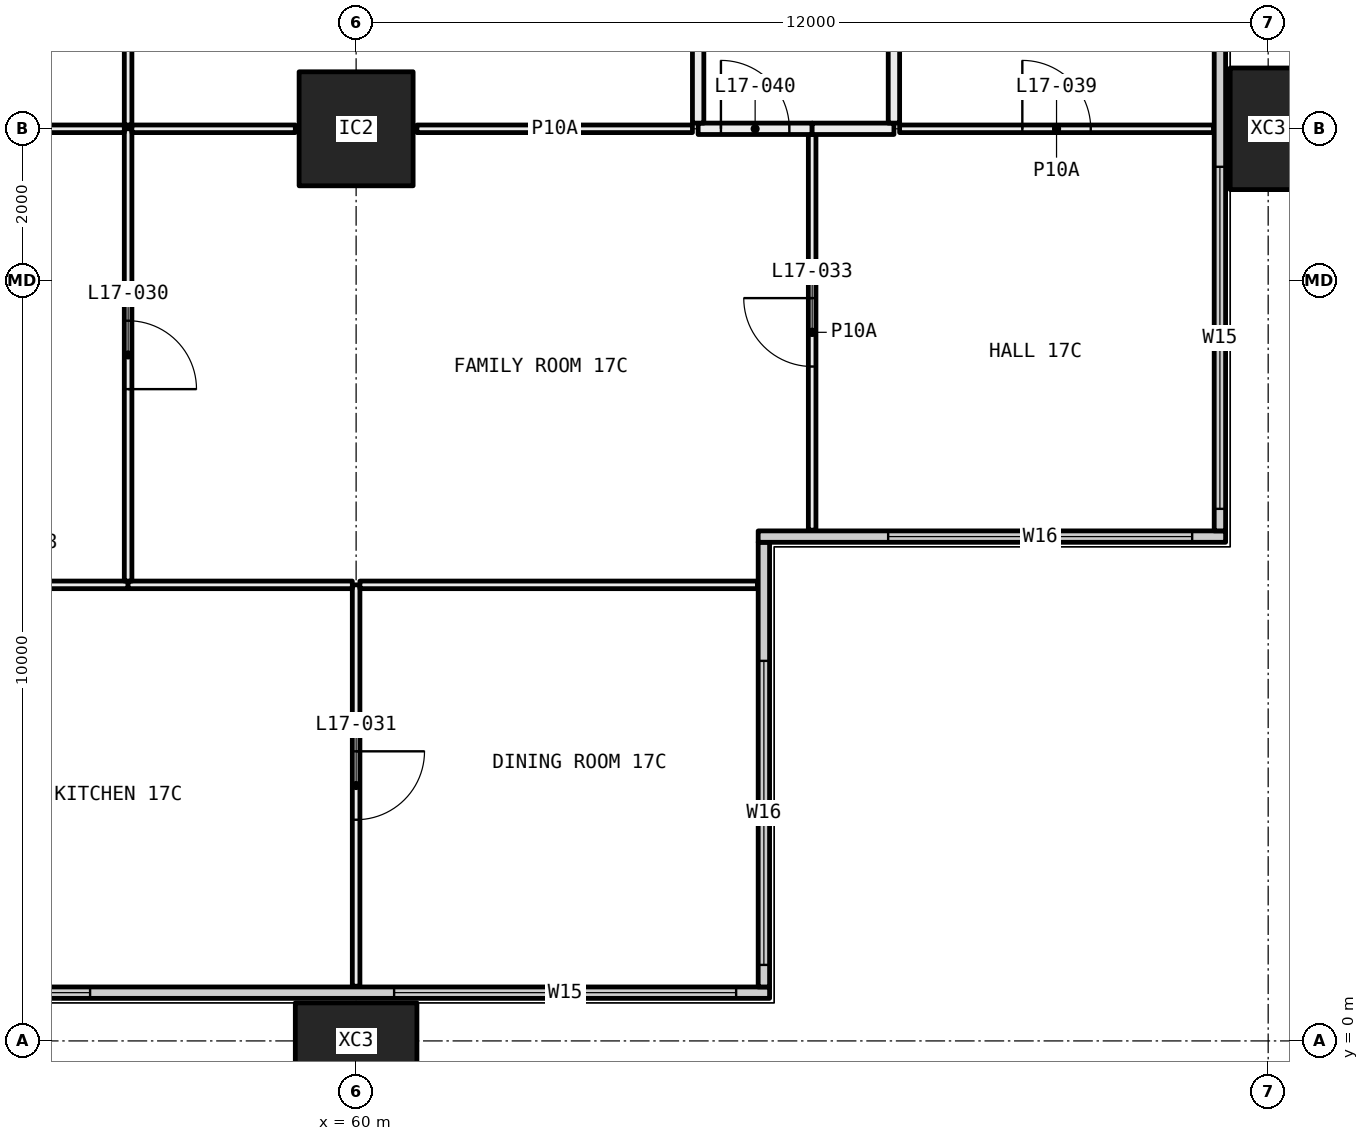
"""IFC4 building model, lengths in metres.
Left out: names, types, materials, properties, quantities, classifications, styles, units other than length and angle.
Written with IfcOpenShell. Run it as: python <this file> out.ifc"""

import sys

from ifc_helpers import new_model, si_unit, direction, frame, frame_2d, origin, origin_2d, place, context, subcontext, project, spatial, rectangle, hollow_rectangle, extrude, element, fill, save


model = new_model("IFC4")
c1 = context("Model", 3, precision=1e-05, world=origin(), true_north=direction((0.0, 1.0)))
c2 = subcontext(c1, "Body", "Model", "MODEL_VIEW")
j1 = project(units=[si_unit("LENGTHUNIT", "METRE"), si_unit("PLANEANGLEUNIT", "RADIAN")], contexts=[c1])
p1 = place(None, origin())
s1 = spatial("IfcSite", under=j1, at=p1, CompositionType="ELEMENT")
p2 = place(p1, origin())
s2 = spatial("IfcBuilding", under=s1, at=p2, CompositionType="ELEMENT")
p3 = place(p2, frame((0.0, 0.0, 71.4)))
s3 = spatial("IfcBuildingStorey", under=s2, at=p3, CompositionType="ELEMENT", Elevation=71.4)
p4 = place(p3, frame((60.0, 0.0, -0.4), z_axis=(0.0, 0.0, 1.0), x_axis=(1.0, 0.0, 0.0)))
e1 = element("IfcColumn", 1, at=p4, inside=s3, PredefinedType="COLUMN", context=c2, shape_type="SweptSolid", body=[
    extrude(hollow_rectangle(XDim=1.6, YDim=1.0, WallThickness=0.065, at=origin_2d()), origin(), (0.0, 0.0, 1.0), 3.45),
])
p5 = place(p3, frame((60.0, 12.0, 0.0), z_axis=(0.0, 0.0, 1.0), x_axis=(1.0, 0.0, 0.0)))
e2 = element("IfcColumn", 2, at=p5, inside=s3, PredefinedType="COLUMN", context=c2, shape_type="SweptSolid", body=[
    extrude(hollow_rectangle(XDim=1.5, YDim=1.5, WallThickness=0.065, at=origin_2d()), origin(), (0.0, 0.0, 1.0), 3.05),
])
p6 = place(p3, frame((72.0, 12.0, -0.4), z_axis=(0.0, 0.0, 1.0), x_axis=(0.0, 1.0, 0.0)))
e3 = element("IfcColumn", 3, at=p6, inside=s3, PredefinedType="COLUMN", context=c2, shape_type="SweptSolid", body=[
    extrude(hollow_rectangle(XDim=1.6, YDim=1.0, WallThickness=0.065, at=origin_2d()), origin(), (0.0, 0.0, 1.0), 3.45),
])
p7 = place(p3, frame((6.56, 0.635, 0.0), z_axis=(0.0, 0.0, 1.0), x_axis=(1.0, 0.0, 0.0)))
e4 = element("IfcWall", 4, at=p7, inside=s3, PredefinedType="ELEMENTEDWALL", context=c2, shape_type="SweptSolid", body=[
    extrude(rectangle(XDim=58.88, YDim=0.15, at=frame_2d((29.44, 0.0))), origin(), (0.0, 0.0, 1.0), 3.05),
])
p8 = place(p7, frame((0.44, 0.0, 0.45)))
e5 = element("IfcOpeningElement", 5, at=p8, cuts=e4, PredefinedType="OPENING", context=c2, shape_type="SweptSolid", body=[
    extrude(rectangle(XDim=4.5, YDim=2.55, at=frame_2d((2.25, 1.275))), frame((0.0, 0.085, 0.0), z_axis=(0.0, -1.0, 0.0), x_axis=(1.0, 0.0, 0.0)), (0.0, 0.0, 1.0), 0.17),
])
p9 = place(p7, frame((7.94, 0.0, 0.45)))
e6 = element("IfcOpeningElement", 6, at=p9, cuts=e4, PredefinedType="OPENING", context=c2, shape_type="SweptSolid", body=[
    extrude(rectangle(XDim=3.0, YDim=2.55, at=frame_2d((1.5, 1.275))), frame((0.0, 0.085, 0.0), z_axis=(0.0, -1.0, 0.0), x_axis=(1.0, 0.0, 0.0)), (0.0, 0.0, 1.0), 0.17),
])
p10 = place(p7, frame((11.94, 0.0, 0.45)))
e7 = element("IfcOpeningElement", 7, at=p10, cuts=e4, PredefinedType="OPENING", context=c2, shape_type="SweptSolid", body=[
    extrude(rectangle(XDim=3.0, YDim=2.55, at=frame_2d((1.5, 1.275))), frame((0.0, 0.085, 0.0), z_axis=(0.0, -1.0, 0.0), x_axis=(1.0, 0.0, 0.0)), (0.0, 0.0, 1.0), 0.17),
])
p11 = place(p7, frame((19.94, 0.0, 0.45)))
e8 = element("IfcOpeningElement", 8, at=p11, cuts=e4, PredefinedType="OPENING", context=c2, shape_type="SweptSolid", body=[
    extrude(rectangle(XDim=3.0, YDim=2.55, at=frame_2d((1.5, 1.275))), frame((0.0, 0.085, 0.0), z_axis=(0.0, -1.0, 0.0), x_axis=(1.0, 0.0, 0.0)), (0.0, 0.0, 1.0), 0.17),
])
p12 = place(p7, frame((23.94, 0.0, 0.45)))
e9 = element("IfcOpeningElement", 9, at=p12, cuts=e4, PredefinedType="OPENING", context=c2, shape_type="SweptSolid", body=[
    extrude(rectangle(XDim=2.0, YDim=2.55, at=frame_2d((1.0, 1.275))), frame((0.0, 0.085, 0.0), z_axis=(0.0, -1.0, 0.0), x_axis=(1.0, 0.0, 0.0)), (0.0, 0.0, 1.0), 0.17),
])
p13 = place(p7, frame((31.94, 0.0, 0.45)))
e10 = element("IfcOpeningElement", 10, at=p13, cuts=e4, PredefinedType="OPENING", context=c2, shape_type="SweptSolid", body=[
    extrude(rectangle(XDim=3.0, YDim=2.55, at=frame_2d((1.5, 1.275))), frame((0.0, 0.085, 0.0), z_axis=(0.0, -1.0, 0.0), x_axis=(1.0, 0.0, 0.0)), (0.0, 0.0, 1.0), 0.17),
])
p14 = place(p7, frame((35.94, 0.0, 0.45)))
e11 = element("IfcOpeningElement", 11, at=p14, cuts=e4, PredefinedType="OPENING", context=c2, shape_type="SweptSolid", body=[
    extrude(rectangle(XDim=3.0, YDim=2.55, at=frame_2d((1.5, 1.275))), frame((0.0, 0.085, 0.0), z_axis=(0.0, -1.0, 0.0), x_axis=(1.0, 0.0, 0.0)), (0.0, 0.0, 1.0), 0.17),
])
p15 = place(p7, frame((43.94, 0.0, 0.45)))
e12 = element("IfcOpeningElement", 12, at=p15, cuts=e4, PredefinedType="OPENING", context=c2, shape_type="SweptSolid", body=[
    extrude(rectangle(XDim=3.0, YDim=2.55, at=frame_2d((1.5, 1.275))), frame((0.0, 0.085, 0.0), z_axis=(0.0, -1.0, 0.0), x_axis=(1.0, 0.0, 0.0)), (0.0, 0.0, 1.0), 0.17),
])
p16 = place(p7, frame((47.94, 0.0, 0.45)))
e13 = element("IfcOpeningElement", 13, at=p16, cuts=e4, PredefinedType="OPENING", context=c2, shape_type="SweptSolid", body=[
    extrude(rectangle(XDim=2.0, YDim=2.55, at=frame_2d((1.0, 1.275))), frame((0.0, 0.085, 0.0), z_axis=(0.0, -1.0, 0.0), x_axis=(1.0, 0.0, 0.0)), (0.0, 0.0, 1.0), 0.17),
])
p17 = place(p7, frame((53.94, 0.0, 0.45)))
e14 = element("IfcOpeningElement", 14, at=p17, cuts=e4, PredefinedType="OPENING", context=c2, shape_type="SweptSolid", body=[
    extrude(rectangle(XDim=4.5, YDim=2.55, at=frame_2d((2.25, 1.275))), frame((0.0, 0.085, 0.0), z_axis=(0.0, -1.0, 0.0), x_axis=(1.0, 0.0, 0.0)), (0.0, 0.0, 1.0), 0.17),
])
p18 = place(p3, frame((65.365, 0.71, 0.0), z_axis=(0.0, 0.0, 1.0), x_axis=(0.0, 1.0, 0.0)))
e15 = element("IfcWall", 15, at=p18, inside=s3, PredefinedType="ELEMENTEDWALL", context=c2, shape_type="SweptSolid", body=[
    extrude(rectangle(XDim=5.85, YDim=0.15, at=frame_2d((2.925, 0.0))), origin(), (0.0, 0.0, 1.0), 3.05),
])
p19 = place(p18, frame((0.29, 0.0, 0.45)))
e16 = element("IfcOpeningElement", 16, at=p19, cuts=e15, PredefinedType="OPENING", context=c2, shape_type="SweptSolid", body=[
    extrude(rectangle(XDim=4.0, YDim=2.55, at=frame_2d((2.0, 1.275))), frame((0.0, 0.085, 0.0), z_axis=(0.0, -1.0, 0.0), x_axis=(1.0, 0.0, 0.0)), (0.0, 0.0, 1.0), 0.17),
])
p20 = place(p3, frame((65.29, 6.635, 0.0), z_axis=(0.0, 0.0, 1.0), x_axis=(1.0, 0.0, 0.0)))
e17 = element("IfcWall", 17, at=p20, inside=s3, PredefinedType="ELEMENTEDWALL", context=c2, shape_type="SweptSolid", body=[
    extrude(rectangle(XDim=6.15, YDim=0.15, at=frame_2d((3.075, 0.0))), origin(), (0.0, 0.0, 1.0), 3.05),
])
p21 = place(p20, frame((1.71, 0.0, 0.45)))
e18 = element("IfcOpeningElement", 18, at=p21, cuts=e17, PredefinedType="OPENING", context=c2, shape_type="SweptSolid", body=[
    extrude(rectangle(XDim=4.0, YDim=2.55, at=frame_2d((2.0, 1.275))), frame((0.0, 0.085, 0.0), z_axis=(0.0, -1.0, 0.0), x_axis=(1.0, 0.0, 0.0)), (0.0, 0.0, 1.0), 0.17),
])
p22 = place(p3, frame((71.365, 6.71, 0.0), z_axis=(0.0, 0.0, 1.0), x_axis=(0.0, 1.0, 0.0)))
e19 = element("IfcWall", 19, at=p22, inside=s3, PredefinedType="ELEMENTEDWALL", context=c2, shape_type="SweptSolid", body=[
    extrude(rectangle(XDim=34.58, YDim=0.15, at=frame_2d((17.29, 0.0))), origin(), (0.0, 0.0, 1.0), 3.05),
])
p23 = place(p22, frame((0.29, 0.0, 0.45)))
e20 = element("IfcOpeningElement", 20, at=p23, cuts=e19, PredefinedType="OPENING", context=c2, shape_type="SweptSolid", body=[
    extrude(rectangle(XDim=4.5, YDim=2.55, at=frame_2d((2.25, 1.275))), frame((0.0, 0.085, 0.0), z_axis=(0.0, -1.0, 0.0), x_axis=(1.0, 0.0, 0.0)), (0.0, 0.0, 1.0), 0.17),
])
p24 = place(p22, frame((7.79, 0.0, 0.45)))
e21 = element("IfcOpeningElement", 21, at=p24, cuts=e19, PredefinedType="OPENING", context=c2, shape_type="SweptSolid", body=[
    extrude(rectangle(XDim=3.0, YDim=2.55, at=frame_2d((1.5, 1.275))), frame((0.0, 0.085, 0.0), z_axis=(0.0, -1.0, 0.0), x_axis=(1.0, 0.0, 0.0)), (0.0, 0.0, 1.0), 0.17),
])
p25 = place(p22, frame((11.79, 0.0, 0.45)))
e22 = element("IfcOpeningElement", 22, at=p25, cuts=e19, PredefinedType="OPENING", context=c2, shape_type="SweptSolid", body=[
    extrude(rectangle(XDim=3.0, YDim=2.55, at=frame_2d((1.5, 1.275))), frame((0.0, 0.085, 0.0), z_axis=(0.0, -1.0, 0.0), x_axis=(1.0, 0.0, 0.0)), (0.0, 0.0, 1.0), 0.17),
])
p26 = place(p22, frame((19.79, 0.0, 0.45)))
e23 = element("IfcOpeningElement", 23, at=p26, cuts=e19, PredefinedType="OPENING", context=c2, shape_type="SweptSolid", body=[
    extrude(rectangle(XDim=3.0, YDim=2.55, at=frame_2d((1.5, 1.275))), frame((0.0, 0.085, 0.0), z_axis=(0.0, -1.0, 0.0), x_axis=(1.0, 0.0, 0.0)), (0.0, 0.0, 1.0), 0.17),
])
p27 = place(p22, frame((23.79, 0.0, 0.45)))
e24 = element("IfcOpeningElement", 24, at=p27, cuts=e19, PredefinedType="OPENING", context=c2, shape_type="SweptSolid", body=[
    extrude(rectangle(XDim=2.0, YDim=2.55, at=frame_2d((1.0, 1.275))), frame((0.0, 0.085, 0.0), z_axis=(0.0, -1.0, 0.0), x_axis=(1.0, 0.0, 0.0)), (0.0, 0.0, 1.0), 0.17),
])
p28 = place(p22, frame((29.79, 0.0, 0.45)))
e25 = element("IfcOpeningElement", 25, at=p28, cuts=e19, PredefinedType="OPENING", context=c2, shape_type="SweptSolid", body=[
    extrude(rectangle(XDim=4.5, YDim=2.55, at=frame_2d((2.25, 1.275))), frame((0.0, 0.085, 0.0), z_axis=(0.0, -1.0, 0.0), x_axis=(1.0, 0.0, 0.0)), (0.0, 0.0, 1.0), 0.17),
])
p29 = place(p3, frame((60.0, 0.72, 0.0), z_axis=(0.0, 0.0, 1.0), x_axis=(0.0, 1.0, 0.0)))
e26 = element("IfcWall", 26, at=p29, inside=s3, PredefinedType="PARTITIONING", context=c2, shape_type="SweptSolid", body=[
    extrude(rectangle(XDim=5.28, YDim=0.1, at=frame_2d((2.64, 0.0))), origin(), (0.0, 0.0, 1.0), 2.45),
])
p30 = place(p29, frame((2.19, 0.0, 0.0)))
e27 = element("IfcOpeningElement", 27, at=p30, cuts=e26, PredefinedType="OPENING", context=c2, shape_type="SweptSolid", body=[
    extrude(rectangle(XDim=0.9, YDim=2.1, at=frame_2d((0.45, 1.05))), frame((0.0, 0.06, 0.0), z_axis=(0.0, -1.0, 0.0), x_axis=(1.0, 0.0, 0.0)), (0.0, 0.0, 1.0), 0.12),
])
p31 = place(p3, frame((57.0, 6.0, 0.0), z_axis=(0.0, 0.0, 1.0), x_axis=(-1.0, 0.0, 0.0)))
e28 = element("IfcWall", 28, at=p31, inside=s3, PredefinedType="PARTITIONING", context=c2, shape_type="SweptSolid", body=[
    extrude(rectangle(XDim=2.95, YDim=0.1, at=frame_2d((1.475, 0.0))), origin(), (0.0, 0.0, 1.0), 3.05),
])
p32 = place(p31, frame((1.025, 0.0, 0.0)))
e29 = element("IfcOpeningElement", 29, at=p32, cuts=e28, PredefinedType="OPENING", context=c2, shape_type="SweptSolid", body=[
    extrude(rectangle(XDim=0.9, YDim=2.1, at=frame_2d((0.45, 1.05))), frame((0.0, 0.06, 0.0), z_axis=(0.0, -1.0, 0.0), x_axis=(1.0, 0.0, 0.0)), (0.0, 0.0, 1.0), 0.12),
])
p33 = place(p3, frame((59.95, 6.0, 0.0), z_axis=(0.0, 0.0, 1.0), x_axis=(-1.0, 0.0, 0.0)))
e30 = element("IfcWall", 30, at=p33, inside=s3, PredefinedType="PARTITIONING", context=c2, shape_type="SweptSolid", body=[
    extrude(rectangle(XDim=2.95, YDim=0.1, at=frame_2d((1.475, 0.0))), origin(), (0.0, 0.0, 1.0), 2.45),
])
p34 = place(p3, frame((65.28, 6.0, 0.0), z_axis=(0.0, 0.0, 1.0), x_axis=(-1.0, 0.0, 0.0)))
e31 = element("IfcWall", 31, at=p34, inside=s3, PredefinedType="PARTITIONING", context=c2, shape_type="SweptSolid", body=[
    extrude(rectangle(XDim=5.23, YDim=0.1, at=frame_2d((2.615, 0.0))), origin(), (0.0, 0.0, 1.0), 2.45),
])
p35 = place(p3, frame((57.0, 6.05, 0.0), z_axis=(0.0, 0.0, 1.0), x_axis=(0.0, 1.0, 0.0)))
e32 = element("IfcWall", 32, at=p35, inside=s3, PredefinedType="PARTITIONING", context=c2, shape_type="SweptSolid", body=[
    extrude(rectangle(XDim=5.95, YDim=0.1, at=frame_2d((2.975, 0.0))), origin(), (0.0, 0.0, 1.0), 2.45),
])
p36 = place(p35, frame((2.525, 0.0, 0.0)))
e33 = element("IfcOpeningElement", 33, at=p36, cuts=e32, PredefinedType="OPENING", context=c2, shape_type="SweptSolid", body=[
    extrude(rectangle(XDim=0.9, YDim=2.1, at=frame_2d((0.45, 1.05))), frame((0.0, 0.06, 0.0), z_axis=(0.0, -1.0, 0.0), x_axis=(1.0, 0.0, 0.0)), (0.0, 0.0, 1.0), 0.12),
])
p37 = place(p3, frame((56.95, 12.0, 0.0), z_axis=(0.0, 0.0, 1.0), x_axis=(-1.0, 0.0, 0.0)))
e34 = element("IfcWall", 34, at=p37, inside=s3, PredefinedType="PARTITIONING", context=c2, shape_type="SweptSolid", body=[
    extrude(rectangle(XDim=4.45, YDim=0.1, at=frame_2d((2.225, 0.0))), origin(), (0.0, 0.0, 1.0), 2.45),
])
p38 = place(p37, frame((1.775, 0.0, 0.0)))
e35 = element("IfcOpeningElement", 35, at=p38, cuts=e34, PredefinedType="OPENING", context=c2, shape_type="SweptSolid", body=[
    extrude(rectangle(XDim=0.9, YDim=2.1, at=frame_2d((0.45, 1.05))), frame((0.0, 0.06, 0.0), z_axis=(0.0, -1.0, 0.0), x_axis=(1.0, 0.0, 0.0)), (0.0, 0.0, 1.0), 0.12),
])
p39 = place(p3, frame((66.0, 6.72, 0.0), z_axis=(0.0, 0.0, 1.0), x_axis=(0.0, 1.0, 0.0)))
e36 = element("IfcWall", 36, at=p39, inside=s3, PredefinedType="PARTITIONING", context=c2, shape_type="SweptSolid", body=[
    extrude(rectangle(XDim=5.205, YDim=0.1, at=frame_2d((2.603, 0.0))), origin(), (0.0, 0.0, 1.0), 2.45),
])
p40 = place(p39, frame((2.153, 0.0, 0.0)))
e37 = element("IfcOpeningElement", 37, at=p40, cuts=e36, PredefinedType="OPENING", context=c2, shape_type="SweptSolid", body=[
    extrude(rectangle(XDim=0.9, YDim=2.1, at=frame_2d((0.45, 1.05))), frame((0.0, 0.06, 0.0), z_axis=(0.0, -1.0, 0.0), x_axis=(1.0, 0.0, 0.0)), (0.0, 0.0, 1.0), 0.12),
])
p41 = place(p3, frame((59.2, 12.0, 0.0), z_axis=(0.0, 0.0, 1.0), x_axis=(-1.0, 0.0, 0.0)))
e38 = element("IfcWall", 38, at=p41, inside=s3, PredefinedType="PARTITIONING", context=c2, shape_type="SweptSolid", body=[
    extrude(rectangle(XDim=2.15, YDim=0.1, at=frame_2d((1.075, 0.0))), origin(), (0.0, 0.0, 1.0), 2.45),
])
p42 = place(p3, frame((64.425, 12.0, 0.0), z_axis=(0.0, 0.0, 1.0), x_axis=(-1.0, 0.0, 0.0)))
e39 = element("IfcWall", 39, at=p42, inside=s3, PredefinedType="PARTITIONING", context=c2, shape_type="SweptSolid", body=[
    extrude(rectangle(XDim=3.625, YDim=0.1, at=frame_2d((1.812, 0.0))), origin(), (0.0, 0.0, 1.0), 2.45),
])
p43 = place(p3, frame((66.0, 12.0, 0.0), z_axis=(0.0, 0.0, 1.0), x_axis=(-1.0, 0.0, 0.0)))
e40 = element("IfcWall", 40, at=p43, inside=s3, PredefinedType="PARTITIONING", context=c2, shape_type="SweptSolid", body=[
    extrude(rectangle(XDim=1.5, YDim=0.15, at=frame_2d((0.75, 0.0))), origin(), (0.0, 0.0, 1.0), 2.45),
])
p44 = place(p43, frame((0.3, 0.0, 0.0)))
e41 = element("IfcOpeningElement", 41, at=p44, cuts=e40, PredefinedType="OPENING", context=c2, shape_type="SweptSolid", body=[
    extrude(rectangle(XDim=0.9, YDim=2.1, at=frame_2d((0.45, 1.05))), frame((0.0, 0.085, 0.0), z_axis=(0.0, -1.0, 0.0), x_axis=(1.0, 0.0, 0.0)), (0.0, 0.0, 1.0), 0.17),
])
p45 = place(p3, frame((71.28, 12.0, 0.0), z_axis=(0.0, 0.0, 1.0), x_axis=(-1.0, 0.0, 0.0)))
e42 = element("IfcWall", 42, at=p45, inside=s3, PredefinedType="PARTITIONING", context=c2, shape_type="SweptSolid", body=[
    extrude(rectangle(XDim=4.129, YDim=0.1, at=frame_2d((2.064, 0.0))), origin(), (0.0, 0.0, 1.0), 2.45),
])
p46 = place(p45, frame((1.615, 0.0, 0.0)))
e43 = element("IfcOpeningElement", 43, at=p46, cuts=e42, PredefinedType="OPENING", context=c2, shape_type="SweptSolid", body=[
    extrude(rectangle(XDim=0.9, YDim=2.1, at=frame_2d((0.45, 1.05))), frame((0.0, 0.06, 0.0), z_axis=(0.0, -1.0, 0.0), x_axis=(1.0, 0.0, 0.0)), (0.0, 0.0, 1.0), 0.12),
])
p47 = place(p3, frame((67.076, 12.0, 0.0), z_axis=(0.0, 0.0, 1.0), x_axis=(-1.0, 0.0, 0.0)))
e44 = element("IfcWall", 44, at=p47, inside=s3, PredefinedType="PARTITIONING", context=c2, shape_type="SweptSolid", body=[
    extrude(rectangle(XDim=1.076, YDim=0.15, at=frame_2d((0.538, 0.0))), origin(), (0.0, 0.0, 1.0), 2.45),
])
p48 = place(p3, frame((57.0, 12.05, 0.0), z_axis=(0.0, 0.0, 1.0), x_axis=(0.0, 1.0, 0.0)))
e45 = element("IfcWall", 45, at=p48, inside=s3, PredefinedType="PARTITIONING", context=c2, shape_type="SweptSolid", body=[
    extrude(rectangle(XDim=5.85, YDim=0.1, at=frame_2d((2.925, 0.0))), origin(), (0.0, 0.0, 1.0), 2.45),
])
p49 = place(p48, frame((2.475, 0.0, 0.0)))
e46 = element("IfcOpeningElement", 46, at=p49, cuts=e45, PredefinedType="OPENING", context=c2, shape_type="SweptSolid", body=[
    extrude(rectangle(XDim=0.9, YDim=2.1, at=frame_2d((0.45, 1.05))), frame((0.0, 0.06, 0.0), z_axis=(0.0, -1.0, 0.0), x_axis=(1.0, 0.0, 0.0)), (0.0, 0.0, 1.0), 0.12),
])
for number, where, z_axis, x_axis in (
    (47, (64.5, 12.075, 0.0), (0.0, 0.0, 1.0), (0.0, 1.0, 0.0)),
    (48, (67.076, 17.9, 0.0), (0.0, 0.0, 1.0), (0.0, -1.0, 0.0)),
):
    element("IfcWall", number, at=place(p3, frame(where, z_axis=z_axis, x_axis=x_axis)), inside=s3, PredefinedType="PARTITIONING", context=c2, shape_type="SweptSolid", body=[
        extrude(rectangle(XDim=5.825, YDim=0.15, at=frame_2d((2.913, 0.0))), origin(), (0.0, 0.0, 1.0), 2.45),
    ])
p50 = place(p16, origin())
e49 = element("IfcWindow", 49, at=p50, inside=s3, PartitioningType="SINGLE_PANEL", PredefinedType="WINDOW", context=c2, shape_type="SweptSolid", body=[
    extrude(rectangle(XDim=2.0, YDim=2.55, at=frame_2d((1.0, 1.275))), frame((0.0, 0.03, 0.0), z_axis=(0.0, -1.0, 0.0), x_axis=(1.0, 0.0, 0.0)), (0.0, 0.0, 1.0), 0.06),
])
fill(e13, e49)
p51 = place(p17, origin())
e50 = element("IfcWindow", 50, at=p51, inside=s3, PartitioningType="SINGLE_PANEL", PredefinedType="WINDOW", context=c2, shape_type="SweptSolid", body=[
    extrude(rectangle(XDim=4.5, YDim=2.55, at=frame_2d((2.25, 1.275))), frame((0.0, 0.03, 0.0), z_axis=(0.0, -1.0, 0.0), x_axis=(1.0, 0.0, 0.0)), (0.0, 0.0, 1.0), 0.06),
])
fill(e14, e50)
p52 = place(p19, origin())
e51 = element("IfcWindow", 51, at=p52, inside=s3, PartitioningType="SINGLE_PANEL", PredefinedType="WINDOW", context=c2, shape_type="SweptSolid", body=[
    extrude(rectangle(XDim=4.0, YDim=2.55, at=frame_2d((2.0, 1.275))), frame((0.0, 0.03, 0.0), z_axis=(0.0, -1.0, 0.0), x_axis=(1.0, 0.0, 0.0)), (0.0, 0.0, 1.0), 0.06),
])
fill(e16, e51)
p53 = place(p21, origin())
e52 = element("IfcWindow", 52, at=p53, inside=s3, PartitioningType="SINGLE_PANEL", PredefinedType="WINDOW", context=c2, shape_type="SweptSolid", body=[
    extrude(rectangle(XDim=4.0, YDim=2.55, at=frame_2d((2.0, 1.275))), frame((0.0, 0.03, 0.0), z_axis=(0.0, -1.0, 0.0), x_axis=(1.0, 0.0, 0.0)), (0.0, 0.0, 1.0), 0.06),
])
fill(e18, e52)
p54 = place(p23, origin())
e53 = element("IfcWindow", 53, at=p54, inside=s3, PartitioningType="SINGLE_PANEL", PredefinedType="WINDOW", context=c2, shape_type="SweptSolid", body=[
    extrude(rectangle(XDim=4.5, YDim=2.55, at=frame_2d((2.25, 1.275))), frame((0.0, 0.03, 0.0), z_axis=(0.0, -1.0, 0.0), x_axis=(1.0, 0.0, 0.0)), (0.0, 0.0, 1.0), 0.06),
])
fill(e20, e53)
p55 = place(p36, frame((0.9, 0.0, 0.0), x_axis=(-1.0, 0.0, 0.0)))
e54 = element("IfcDoor", 54, at=p55, inside=s3, OperationType="SINGLE_SWING_LEFT", PredefinedType="DOOR", context=c2, shape_type="SweptSolid", body=[
    extrude(rectangle(XDim=0.9, YDim=2.1, at=frame_2d((0.45, 1.05))), frame((0.0, 0.025, 0.0), z_axis=(0.0, -1.0, 0.0), x_axis=(1.0, 0.0, 0.0)), (0.0, 0.0, 1.0), 0.05),
])
fill(e33, e54)
p56 = place(p30, frame((0.9, 0.0, 0.0), x_axis=(-1.0, 0.0, 0.0)))
e55 = element("IfcDoor", 55, at=p56, inside=s3, OperationType="SINGLE_SWING_RIGHT", PredefinedType="DOOR", context=c2, shape_type="SweptSolid", body=[
    extrude(rectangle(XDim=0.9, YDim=2.1, at=frame_2d((0.45, 1.05))), frame((0.0, 0.025, 0.0), z_axis=(0.0, -1.0, 0.0), x_axis=(1.0, 0.0, 0.0)), (0.0, 0.0, 1.0), 0.05),
])
fill(e27, e55)
p57 = place(p40, origin())
e56 = element("IfcDoor", 56, at=p57, inside=s3, OperationType="SINGLE_SWING_LEFT", PredefinedType="DOOR", context=c2, shape_type="SweptSolid", body=[
    extrude(rectangle(XDim=0.9, YDim=2.1, at=frame_2d((0.45, 1.05))), frame((0.0, 0.025, 0.0), z_axis=(0.0, -1.0, 0.0), x_axis=(1.0, 0.0, 0.0)), (0.0, 0.0, 1.0), 0.05),
])
fill(e37, e56)
p58 = place(p46, frame((0.9, 0.0, 0.0), x_axis=(-1.0, 0.0, 0.0)))
e57 = element("IfcDoor", 57, at=p58, inside=s3, OperationType="SINGLE_SWING_RIGHT", PredefinedType="DOOR", context=c2, shape_type="SweptSolid", body=[
    extrude(rectangle(XDim=0.9, YDim=2.1, at=frame_2d((0.45, 1.05))), frame((0.0, 0.025, 0.0), z_axis=(0.0, -1.0, 0.0), x_axis=(1.0, 0.0, 0.0)), (0.0, 0.0, 1.0), 0.05),
])
fill(e43, e57)
p59 = place(p44, frame((0.9, 0.0, 0.0), x_axis=(-1.0, 0.0, 0.0)))
e58 = element("IfcDoor", 58, at=p59, inside=s3, OperationType="SINGLE_SWING_RIGHT", PredefinedType="DOOR", context=c2, shape_type="SweptSolid", body=[
    extrude(rectangle(XDim=0.9, YDim=2.1, at=frame_2d((0.45, 1.05))), frame((0.0, 0.025, 0.0), z_axis=(0.0, -1.0, 0.0), x_axis=(1.0, 0.0, 0.0)), (0.0, 0.0, 1.0), 0.05),
])
fill(e41, e58)
save(model, sys.argv[1])
